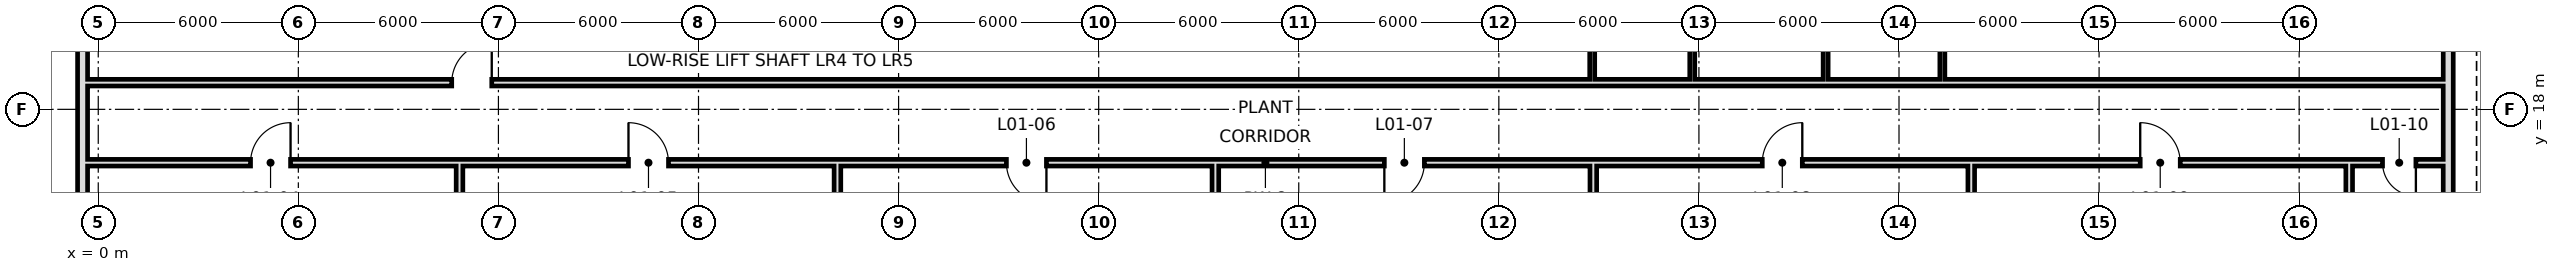
"""IFC4 building model, lengths in metres.
Left out: names, types, materials, properties, quantities, classifications, styles, units other than length and angle.
Written with IfcOpenShell. Run it as: python <this file> out.ifc"""

import sys

from ifc_helpers import new_model, si_unit, direction, frame, frame_2d, origin, place, context, subcontext, project, spatial, rectangle, extrude, element, fill, save


model = new_model("IFC4")
c1 = context("Model", 3, precision=1e-05, world=origin(), true_north=direction((0.0, 1.0)))
c2 = subcontext(c1, "Body", "Model", "MODEL_VIEW")
j1 = project(units=[si_unit("LENGTHUNIT", "METRE"), si_unit("PLANEANGLEUNIT", "RADIAN")], contexts=[c1])
p1 = place(None, origin())
s1 = spatial("IfcSite", under=j1, at=p1, CompositionType="ELEMENT")
p2 = place(p1, origin())
s2 = spatial("IfcBuilding", under=s1, at=p2, CompositionType="ELEMENT")
p3 = place(p2, frame((0.0, 0.0, 15.0)))
s3 = spatial("IfcBuildingStorey", under=s2, at=p3, CompositionType="ELEMENT", Elevation=15.0)
p4 = place(p3, frame((70.47, -0.195, 0.0), z_axis=(0.0, 0.0, 1.0), x_axis=(0.0, 1.0, 0.0)))
e1 = element("IfcWall", 1, at=p4, inside=s3, PredefinedType="SOLIDWALL", context=c2, shape_type="SweptSolid", body=[
    extrude(rectangle(XDim=46.389, YDim=0.3, at=frame_2d((23.195, 0.0))), origin(), (0.0, 0.0, 1.0), 5.0),
])
p5 = place(p4, frame((2.17, 0.0, 0.9)))
e2 = element("IfcOpeningElement", 2, at=p5, cuts=e1, PredefinedType="OPENING", context=c2, shape_type="SweptSolid", body=[
    extrude(rectangle(XDim=1.8, YDim=1.5, at=frame_2d((0.9, 0.75))), frame((0.0, 0.16, 0.0), z_axis=(0.0, -1.0, 0.0), x_axis=(1.0, 0.0, 0.0)), (0.0, 0.0, 1.0), 0.32),
])
p6 = place(p4, frame((12.495, 0.0, 0.9)))
e3 = element("IfcOpeningElement", 3, at=p6, cuts=e1, PredefinedType="OPENING", context=c2, shape_type="SweptSolid", body=[
    extrude(rectangle(XDim=1.8, YDim=1.5, at=frame_2d((0.9, 0.75))), frame((0.0, 0.16, 0.0), z_axis=(0.0, -1.0, 0.0), x_axis=(1.0, 0.0, 0.0)), (0.0, 0.0, 1.0), 0.32),
])
p7 = place(p4, frame((26.295, 0.0, 0.9)))
e4 = element("IfcOpeningElement", 4, at=p7, cuts=e1, PredefinedType="OPENING", context=c2, shape_type="SweptSolid", body=[
    extrude(rectangle(XDim=1.8, YDim=1.5, at=frame_2d((0.9, 0.75))), frame((0.0, 0.16, 0.0), z_axis=(0.0, -1.0, 0.0), x_axis=(1.0, 0.0, 0.0)), (0.0, 0.0, 1.0), 0.32),
])
p8 = place(p4, frame((38.295, 0.0, 0.9)))
e5 = element("IfcOpeningElement", 5, at=p8, cuts=e1, PredefinedType="OPENING", context=c2, shape_type="SweptSolid", body=[
    extrude(rectangle(XDim=1.8, YDim=1.5, at=frame_2d((0.9, 0.75))), frame((0.0, 0.16, 0.0), z_axis=(0.0, -1.0, 0.0), x_axis=(1.0, 0.0, 0.0)), (0.0, 0.0, 1.0), 0.32),
])
p9 = place(p3, frame((-0.47, 46.195, 0.0), z_axis=(0.0, 0.0, 1.0), x_axis=(0.0, -1.0, 0.0)))
e6 = element("IfcWall", 6, at=p9, inside=s3, PredefinedType="SOLIDWALL", context=c2, shape_type="SweptSolid", body=[
    extrude(rectangle(XDim=46.389, YDim=0.3, at=frame_2d((23.195, 0.0))), origin(), (0.0, 0.0, 1.0), 5.0),
])
p10 = place(p9, frame((1.17, 0.0, 0.9)))
e7 = element("IfcOpeningElement", 7, at=p10, cuts=e6, PredefinedType="OPENING", context=c2, shape_type="SweptSolid", body=[
    extrude(rectangle(XDim=1.8, YDim=1.5, at=frame_2d((0.9, 0.75))), frame((0.0, 0.16, 0.0), z_axis=(0.0, -1.0, 0.0), x_axis=(1.0, 0.0, 0.0)), (0.0, 0.0, 1.0), 0.32),
])
p11 = place(p9, frame((12.295, 0.0, 0.9)))
e8 = element("IfcOpeningElement", 8, at=p11, cuts=e6, PredefinedType="OPENING", context=c2, shape_type="SweptSolid", body=[
    extrude(rectangle(XDim=1.8, YDim=1.5, at=frame_2d((0.9, 0.75))), frame((0.0, 0.16, 0.0), z_axis=(0.0, -1.0, 0.0), x_axis=(1.0, 0.0, 0.0)), (0.0, 0.0, 1.0), 0.32),
])
p12 = place(p9, frame((24.295, 0.0, 0.9)))
e9 = element("IfcOpeningElement", 9, at=p12, cuts=e6, PredefinedType="OPENING", context=c2, shape_type="SweptSolid", body=[
    extrude(rectangle(XDim=1.8, YDim=1.5, at=frame_2d((0.9, 0.75))), frame((0.0, 0.16, 0.0), z_axis=(0.0, -1.0, 0.0), x_axis=(1.0, 0.0, 0.0)), (0.0, 0.0, 1.0), 0.32),
])
p13 = place(p9, frame((36.295, 0.0, 0.9)))
e10 = element("IfcOpeningElement", 10, at=p13, cuts=e6, PredefinedType="OPENING", context=c2, shape_type="SweptSolid", body=[
    extrude(rectangle(XDim=1.8, YDim=1.5, at=frame_2d((0.9, 0.75))), frame((0.0, 0.16, 0.0), z_axis=(0.0, -1.0, 0.0), x_axis=(1.0, 0.0, 0.0)), (0.0, 0.0, 1.0), 0.32),
])
for number, where, z_axis, x_axis in (
    (11, (10.833, -6.5, 0.0), (0.0, 0.0, 1.0), (0.0, 1.0, 0.0)),
    (12, (22.167, -6.5, 0.0), (0.0, 0.0, 1.0), (0.0, 1.0, 0.0)),
    (13, (33.5, -6.5, 0.0), (0.0, 0.0, 1.0), (0.0, 1.0, 0.0)),
):
    element("IfcWall", number, at=place(p3, frame(where, z_axis=z_axis, x_axis=x_axis)), inside=s3, PredefinedType="SOLIDWALL", context=c2, shape_type="SweptSolid", body=[
        extrude(rectangle(XDim=22.8, YDim=0.2, at=frame_2d((11.4, 0.0))), origin(), (0.0, 0.0, 1.0), 3.2),
    ])
p14 = place(p3, frame((44.8, 18.9, 0.0), z_axis=(0.0, 0.0, 1.0), x_axis=(0.0, 1.0, 0.0)))
e14 = element("IfcWall", 14, at=p14, inside=s3, PredefinedType="PARTITIONING", context=c2, shape_type="SweptSolid", body=[
    extrude(rectangle(XDim=33.6, YDim=0.15, at=frame_2d((16.8, 0.0))), origin(), (0.0, 0.0, 1.0), 5.0),
])
p15 = place(p14, frame((10.5, 0.0, 0.0)))
e15 = element("IfcOpeningElement", 15, at=p15, cuts=e14, PredefinedType="OPENING", context=c2, shape_type="SweptSolid", body=[
    extrude(rectangle(XDim=1.2, YDim=2.4, at=frame_2d((0.6, 1.2))), frame((0.0, 0.085, 0.0), z_axis=(0.0, -1.0, 0.0), x_axis=(1.0, 0.0, 0.0)), (0.0, 0.0, 1.0), 0.17),
])
p16 = place(p3, frame((44.833, -6.5, 0.0), z_axis=(0.0, 0.0, 1.0), x_axis=(0.0, 1.0, 0.0)))
e16 = element("IfcWall", 16, at=p16, inside=s3, PredefinedType="SOLIDWALL", context=c2, shape_type="SweptSolid", body=[
    extrude(rectangle(XDim=22.8, YDim=0.2, at=frame_2d((11.4, 0.0))), origin(), (0.0, 0.0, 1.0), 3.2),
])
p17 = place(p3, frame((47.8, 18.9, 0.0), z_axis=(0.0, 0.0, 1.0), x_axis=(0.0, 1.0, 0.0)))
e17 = element("IfcWall", 17, at=p17, inside=s3, PredefinedType="PARTITIONING", context=c2, shape_type="SweptSolid", body=[
    extrude(rectangle(XDim=3.975, YDim=0.15, at=frame_2d((1.988, 0.0))), origin(), (0.0, 0.0, 1.0), 3.2),
])
p18 = place(p3, frame((51.8, 18.9, 0.0), z_axis=(0.0, 0.0, 1.0), x_axis=(0.0, 1.0, 0.0)))
e18 = element("IfcWall", 18, at=p18, inside=s3, PredefinedType="PARTITIONING", context=c2, shape_type="SweptSolid", body=[
    extrude(rectangle(XDim=3.825, YDim=0.15, at=frame_2d((1.913, 0.0))), origin(), (0.0, 0.0, 1.0), 5.0),
])
p19 = place(p3, frame((55.3, 18.9, 0.0), z_axis=(0.0, 0.0, 1.0), x_axis=(0.0, 1.0, 0.0)))
e19 = element("IfcWall", 19, at=p19, inside=s3, PredefinedType="PARTITIONING", context=c2, shape_type="SweptSolid", body=[
    extrude(rectangle(XDim=3.975, YDim=0.15, at=frame_2d((1.988, 0.0))), origin(), (0.0, 0.0, 1.0), 5.0),
])
p20 = place(p19, frame((1.4, 0.0, 0.0)))
e20 = element("IfcOpeningElement", 20, at=p20, cuts=e19, PredefinedType="OPENING", context=c2, shape_type="SweptSolid", body=[
    extrude(rectangle(XDim=1.0, YDim=2.4, at=frame_2d((0.5, 1.2))), frame((0.0, 0.085, 0.0), z_axis=(0.0, -1.0, 0.0), x_axis=(1.0, 0.0, 0.0)), (0.0, 0.0, 1.0), 0.17),
])
p21 = place(p3, frame((56.167, -6.5, 0.0), z_axis=(0.0, 0.0, 1.0), x_axis=(0.0, 1.0, 0.0)))
e21 = element("IfcWall", 21, at=p21, inside=s3, PredefinedType="SOLIDWALL", context=c2, shape_type="SweptSolid", body=[
    extrude(rectangle(XDim=22.8, YDim=0.2, at=frame_2d((11.4, 0.0))), origin(), (0.0, 0.0, 1.0), 3.2),
])
p22 = place(p3, frame((67.5, -3.207, 0.0), z_axis=(0.0, 0.0, 1.0), x_axis=(0.0, 1.0, 0.0)))
e22 = element("IfcWall", 22, at=p22, inside=s3, PredefinedType="SOLIDWALL", context=c2, shape_type="SweptSolid", body=[
    extrude(rectangle(XDim=19.507, YDim=0.2, at=frame_2d((9.753, 0.0))), origin(), (0.0, 0.0, 1.0), 3.2),
])
p23 = place(p3, frame((-0.5, 16.4, 0.0), z_axis=(0.0, 0.0, 1.0), x_axis=(1.0, 0.0, 0.0)))
e23 = element("IfcWall", 23, at=p23, inside=s3, PredefinedType="SOLIDWALL", context=c2, shape_type="SweptSolid", body=[
    extrude(rectangle(XDim=71.0, YDim=0.2, at=frame_2d((35.5, 0.0))), origin(), (0.0, 0.0, 1.0), 3.2),
])
p24 = place(p23, frame((5.067, 0.0, 0.0)))
e24 = element("IfcOpeningElement", 24, at=p24, cuts=e23, PredefinedType="OPENING", context=c2, shape_type="SweptSolid", body=[
    extrude(rectangle(XDim=1.2, YDim=2.4, at=frame_2d((0.6, 1.2))), frame((0.0, 0.11, 0.0), z_axis=(0.0, -1.0, 0.0), x_axis=(1.0, 0.0, 0.0)), (0.0, 0.0, 1.0), 0.22),
])
p25 = place(p23, frame((16.4, 0.0, 0.0)))
e25 = element("IfcOpeningElement", 25, at=p25, cuts=e23, PredefinedType="OPENING", context=c2, shape_type="SweptSolid", body=[
    extrude(rectangle(XDim=1.2, YDim=2.4, at=frame_2d((0.6, 1.2))), frame((0.0, 0.11, 0.0), z_axis=(0.0, -1.0, 0.0), x_axis=(1.0, 0.0, 0.0)), (0.0, 0.0, 1.0), 0.22),
])
p26 = place(p23, frame((27.733, 0.0, 0.0)))
e26 = element("IfcOpeningElement", 26, at=p26, cuts=e23, PredefinedType="OPENING", context=c2, shape_type="SweptSolid", body=[
    extrude(rectangle(XDim=1.2, YDim=2.4, at=frame_2d((0.6, 1.2))), frame((0.0, 0.11, 0.0), z_axis=(0.0, -1.0, 0.0), x_axis=(1.0, 0.0, 0.0)), (0.0, 0.0, 1.0), 0.22),
])
p27 = place(p23, frame((39.067, 0.0, 0.0)))
e27 = element("IfcOpeningElement", 27, at=p27, cuts=e23, PredefinedType="OPENING", context=c2, shape_type="SweptSolid", body=[
    extrude(rectangle(XDim=1.2, YDim=2.4, at=frame_2d((0.6, 1.2))), frame((0.0, 0.11, 0.0), z_axis=(0.0, -1.0, 0.0), x_axis=(1.0, 0.0, 0.0)), (0.0, 0.0, 1.0), 0.22),
])
p28 = place(p23, frame((50.4, 0.0, 0.0)))
e28 = element("IfcOpeningElement", 28, at=p28, cuts=e23, PredefinedType="OPENING", context=c2, shape_type="SweptSolid", body=[
    extrude(rectangle(XDim=1.2, YDim=2.4, at=frame_2d((0.6, 1.2))), frame((0.0, 0.11, 0.0), z_axis=(0.0, -1.0, 0.0), x_axis=(1.0, 0.0, 0.0)), (0.0, 0.0, 1.0), 0.22),
])
p29 = place(p23, frame((61.733, 0.0, 0.0)))
e29 = element("IfcOpeningElement", 29, at=p29, cuts=e23, PredefinedType="OPENING", context=c2, shape_type="SweptSolid", body=[
    extrude(rectangle(XDim=1.2, YDim=2.4, at=frame_2d((0.6, 1.2))), frame((0.0, 0.11, 0.0), z_axis=(0.0, -1.0, 0.0), x_axis=(1.0, 0.0, 0.0)), (0.0, 0.0, 1.0), 0.22),
])
p30 = place(p23, frame((69.0, 0.0, 0.0)))
e30 = element("IfcOpeningElement", 30, at=p30, cuts=e23, PredefinedType="OPENING", context=c2, shape_type="SweptSolid", body=[
    extrude(rectangle(XDim=1.0, YDim=2.4, at=frame_2d((0.5, 1.2))), frame((0.0, 0.11, 0.0), z_axis=(0.0, -1.0, 0.0), x_axis=(1.0, 0.0, 0.0)), (0.0, 0.0, 1.0), 0.22),
])
p31 = place(p3, frame((-0.5, 18.8, 0.0), z_axis=(0.0, 0.0, 1.0), x_axis=(1.0, 0.0, 0.0)))
e31 = element("IfcWall", 31, at=p31, inside=s3, PredefinedType="SOLIDWALL", context=c2, shape_type="SweptSolid", body=[
    extrude(rectangle(XDim=71.0, YDim=0.2, at=frame_2d((35.5, 0.0))), origin(), (0.0, 0.0, 1.0), 3.2),
])
p32 = place(p31, frame((11.1, 0.0, 0.0)))
e32 = element("IfcOpeningElement", 32, at=p32, cuts=e31, PredefinedType="OPENING", context=c2, shape_type="SweptSolid", body=[
    extrude(rectangle(XDim=1.2, YDim=2.4, at=frame_2d((0.6, 1.2))), frame((0.0, 0.11, 0.0), z_axis=(0.0, -1.0, 0.0), x_axis=(1.0, 0.0, 0.0)), (0.0, 0.0, 1.0), 0.22),
])
p33 = place(p24, frame((1.2, 0.0, 0.0), z_axis=(0.0, 0.0, 1.0), x_axis=(-1.0, 0.0, 0.0)))
e33 = element("IfcDoor", 33, at=p33, inside=s3, OperationType="SINGLE_SWING_LEFT", PredefinedType="DOOR", context=c2, shape_type="SweptSolid", body=[
    extrude(rectangle(XDim=1.2, YDim=2.4, at=frame_2d((0.6, 1.2))), frame((0.0, 0.025, 0.0), z_axis=(0.0, -1.0, 0.0), x_axis=(1.0, 0.0, 0.0)), (0.0, 0.0, 1.0), 0.05),
])
fill(e24, e33)
p34 = place(p25, origin())
e34 = element("IfcDoor", 34, at=p34, inside=s3, OperationType="SINGLE_SWING_LEFT", PredefinedType="DOOR", context=c2, shape_type="SweptSolid", body=[
    extrude(rectangle(XDim=1.2, YDim=2.4, at=frame_2d((0.6, 1.2))), frame((0.0, 0.025, 0.0), z_axis=(0.0, -1.0, 0.0), x_axis=(1.0, 0.0, 0.0)), (0.0, 0.0, 1.0), 0.05),
])
fill(e25, e34)
p35 = place(p26, origin())
e35 = element("IfcDoor", 35, at=p35, inside=s3, OperationType="SINGLE_SWING_RIGHT", PredefinedType="DOOR", context=c2, shape_type="SweptSolid", body=[
    extrude(rectangle(XDim=1.2, YDim=2.4, at=frame_2d((0.6, 1.2))), frame((0.0, 0.025, 0.0), z_axis=(0.0, -1.0, 0.0), x_axis=(1.0, 0.0, 0.0)), (0.0, 0.0, 1.0), 0.05),
])
fill(e26, e35)
p36 = place(p27, frame((1.2, 0.0, 0.0), z_axis=(0.0, 0.0, 1.0), x_axis=(-1.0, 0.0, 0.0)))
e36 = element("IfcDoor", 36, at=p36, inside=s3, OperationType="SINGLE_SWING_RIGHT", PredefinedType="DOOR", context=c2, shape_type="SweptSolid", body=[
    extrude(rectangle(XDim=1.2, YDim=2.4, at=frame_2d((0.6, 1.2))), frame((0.0, 0.025, 0.0), z_axis=(0.0, -1.0, 0.0), x_axis=(1.0, 0.0, 0.0)), (0.0, 0.0, 1.0), 0.05),
])
fill(e27, e36)
p37 = place(p28, frame((1.2, 0.0, 0.0), z_axis=(0.0, 0.0, 1.0), x_axis=(-1.0, 0.0, 0.0)))
e37 = element("IfcDoor", 37, at=p37, inside=s3, OperationType="SINGLE_SWING_LEFT", PredefinedType="DOOR", context=c2, shape_type="SweptSolid", body=[
    extrude(rectangle(XDim=1.2, YDim=2.4, at=frame_2d((0.6, 1.2))), frame((0.0, 0.025, 0.0), z_axis=(0.0, -1.0, 0.0), x_axis=(1.0, 0.0, 0.0)), (0.0, 0.0, 1.0), 0.05),
])
fill(e28, e37)
p38 = place(p29, origin())
e38 = element("IfcDoor", 38, at=p38, inside=s3, OperationType="SINGLE_SWING_LEFT", PredefinedType="DOOR", context=c2, shape_type="SweptSolid", body=[
    extrude(rectangle(XDim=1.2, YDim=2.4, at=frame_2d((0.6, 1.2))), frame((0.0, 0.025, 0.0), z_axis=(0.0, -1.0, 0.0), x_axis=(1.0, 0.0, 0.0)), (0.0, 0.0, 1.0), 0.05),
])
fill(e29, e38)
p39 = place(p30, origin())
e39 = element("IfcDoor", 39, at=p39, inside=s3, OperationType="SINGLE_SWING_RIGHT", PredefinedType="DOOR", context=c2, shape_type="SweptSolid", body=[
    extrude(rectangle(XDim=1.0, YDim=2.4, at=frame_2d((0.5, 1.2))), frame((0.0, 0.025, 0.0), z_axis=(0.0, -1.0, 0.0), x_axis=(1.0, 0.0, 0.0)), (0.0, 0.0, 1.0), 0.05),
])
fill(e30, e39)
p40 = place(p32, frame((1.2, 0.0, 0.0), z_axis=(0.0, 0.0, 1.0), x_axis=(-1.0, 0.0, 0.0)))
e40 = element("IfcDoor", 40, at=p40, inside=s3, OperationType="SINGLE_SWING_LEFT", PredefinedType="DOOR", context=c2, shape_type="SweptSolid", body=[
    extrude(rectangle(XDim=1.2, YDim=2.4, at=frame_2d((0.6, 1.2))), frame((0.0, 0.025, 0.0), z_axis=(0.0, -1.0, 0.0), x_axis=(1.0, 0.0, 0.0)), (0.0, 0.0, 1.0), 0.05),
])
fill(e32, e40)
save(model, sys.argv[1])
